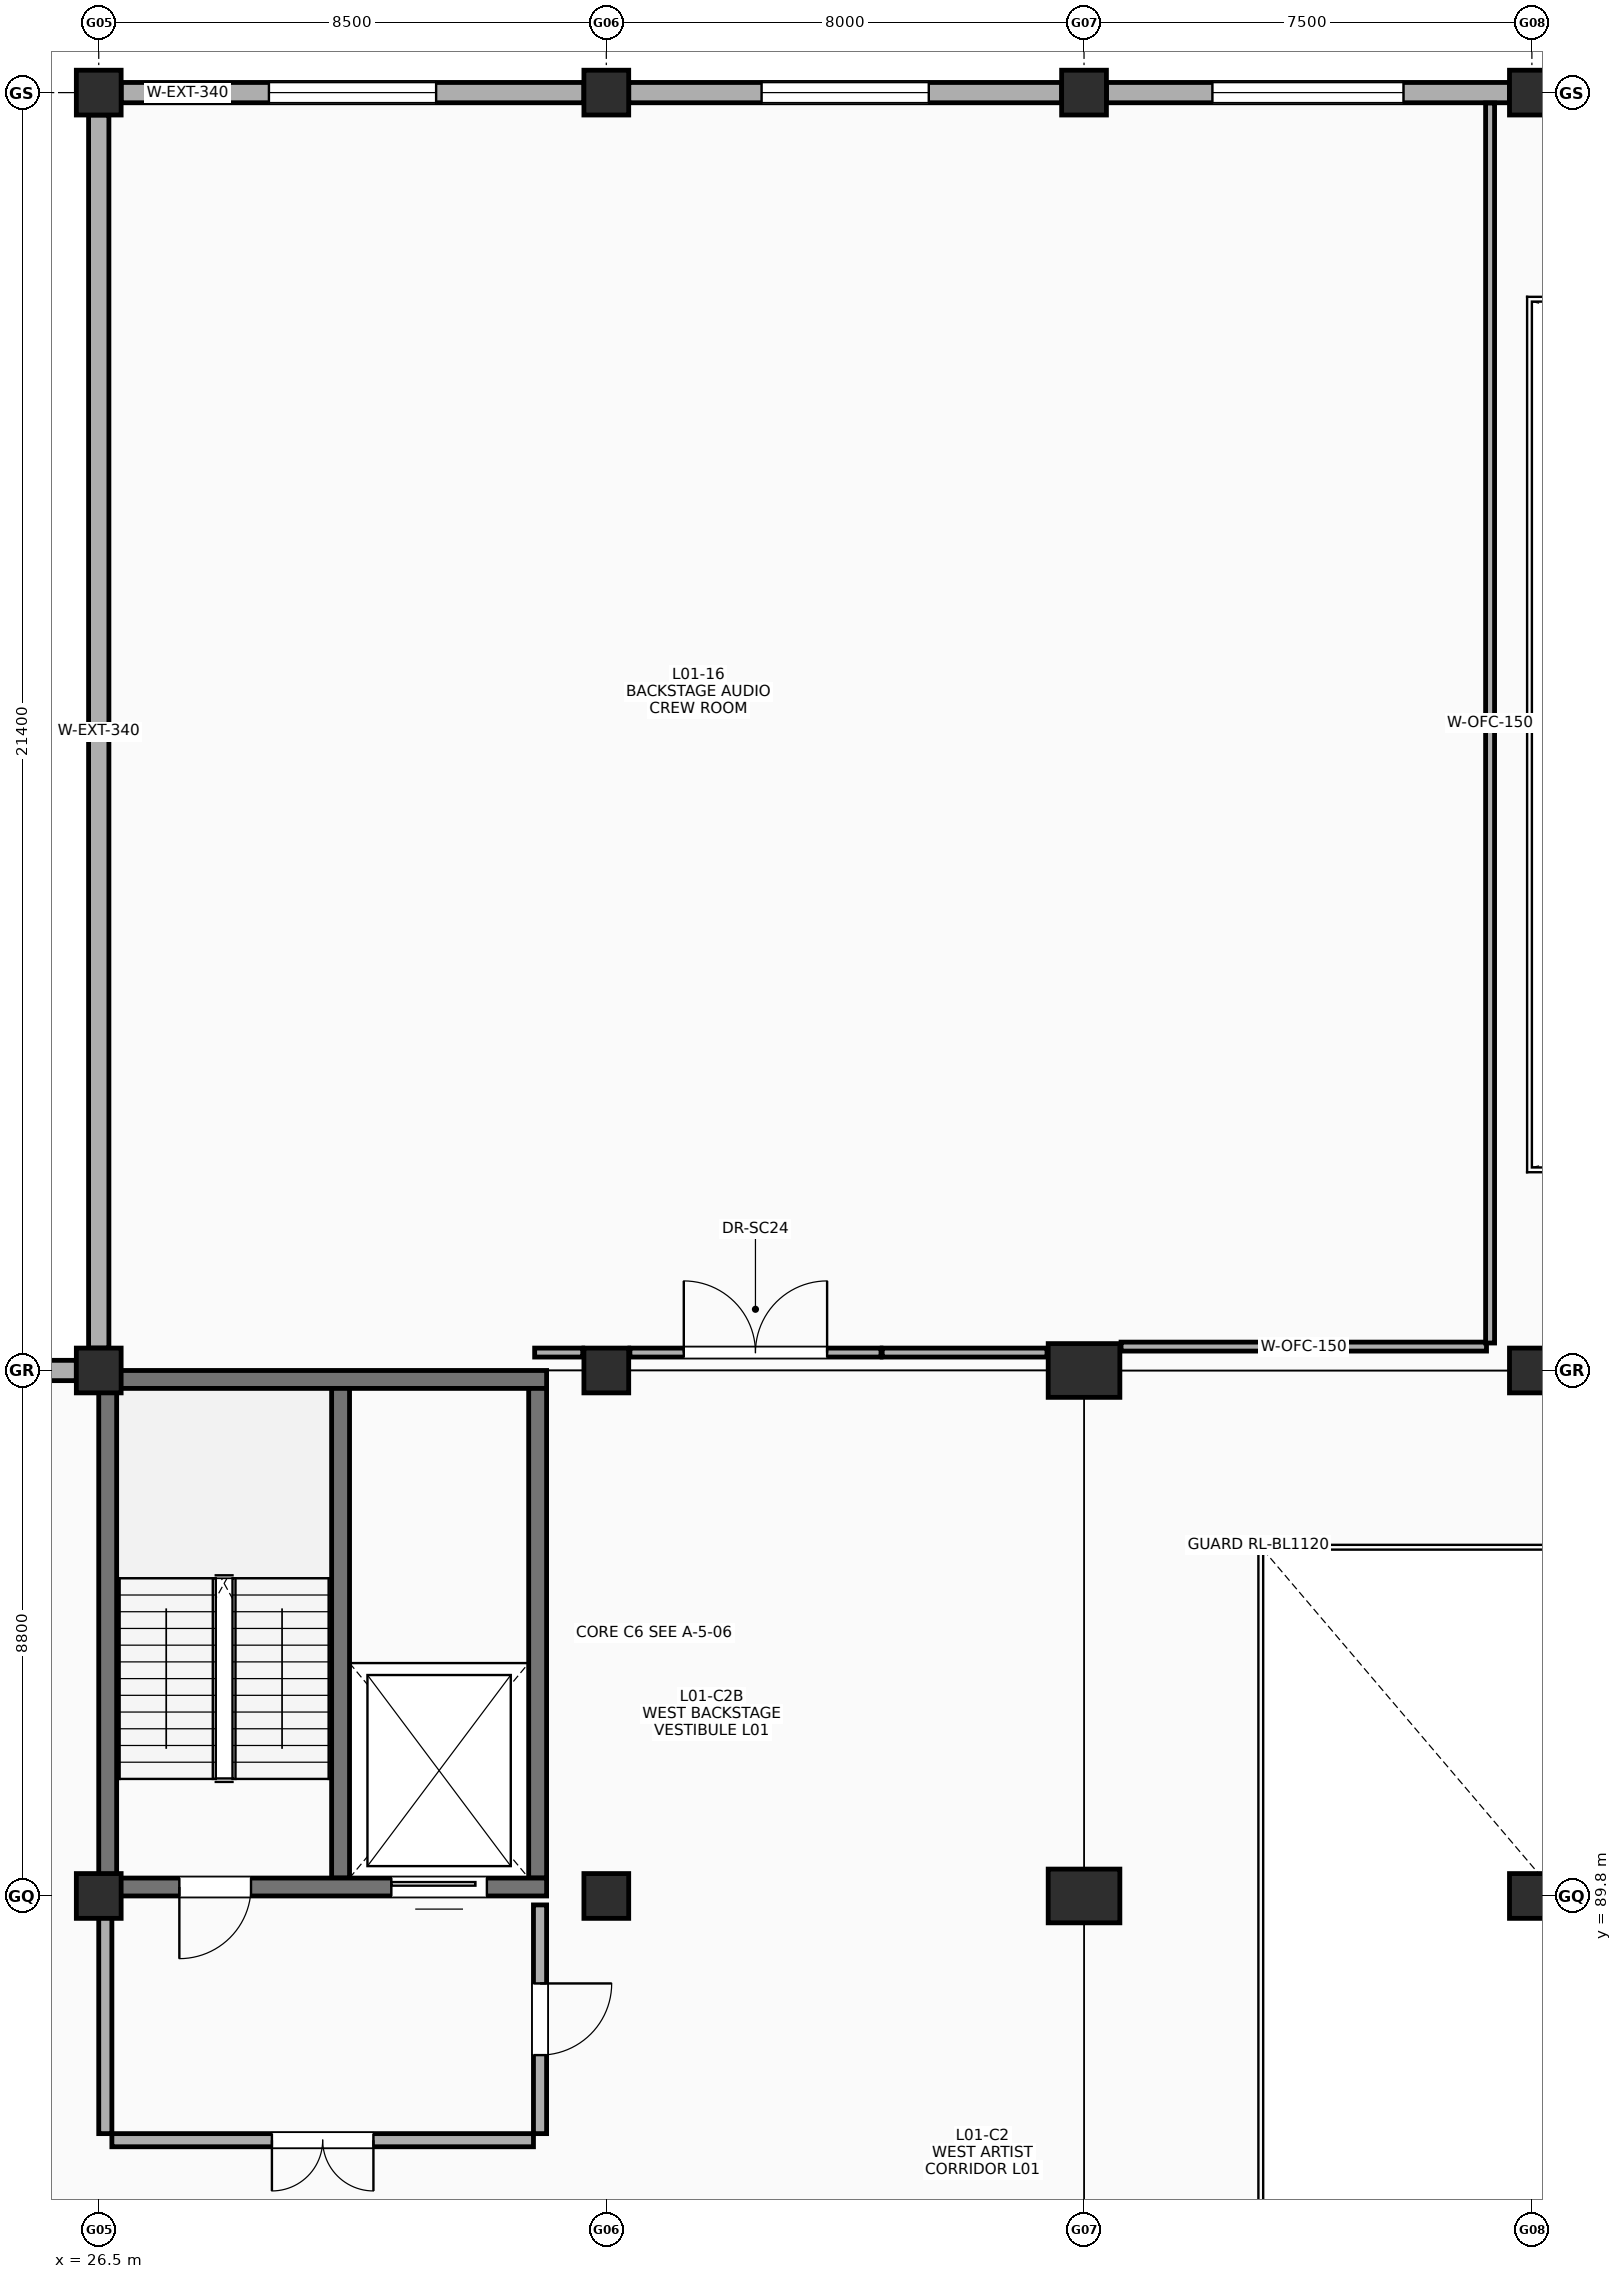
"""IFC4 building model, lengths in metres.
Left out: names, types, materials, properties, quantities, classifications, styles, units other than length and angle.
Written with IfcOpenShell. Run it as: python <this file> out.ifc"""

import sys

from ifc_helpers import new_model, si_unit, direction, frame, frame_2d, origin, origin_2d, place, context, subcontext, project, spatial, rectangle, extrude, element, fill, save


model = new_model("IFC4")
c1 = context("Model", 3, precision=1e-05, world=origin(), true_north=direction((0.0, 1.0)))
c2 = subcontext(c1, "Body", "Model", "MODEL_VIEW")
j1 = project(units=[si_unit("LENGTHUNIT", "METRE"), si_unit("PLANEANGLEUNIT", "RADIAN")], contexts=[c1])
p1 = place(None, origin())
s1 = spatial("IfcSite", under=j1, at=p1, CompositionType="ELEMENT")
p2 = place(p1, origin())
s2 = spatial("IfcBuilding", under=s1, at=p2, CompositionType="ELEMENT")
p3 = place(p2, frame((0.0, 0.0, 5.4)))
s3 = spatial("IfcBuildingStorey", under=s2, at=p3, CompositionType="ELEMENT", Elevation=5.4)
for number, where, z_axis, x_axis in (
    (1, (26.5, 89.8, 0.0), (0.0, 0.0, 1.0), (1.0, 0.0, 0.0)),
    (2, (26.5, 98.6, 0.0), (0.0, 0.0, 1.0), (1.0, 0.0, 0.0)),
    (3, (26.5, 120.0, 0.0), (0.0, 0.0, 1.0), (1.0, 0.0, 0.0)),
    (4, (35.0, 89.8, 0.0), (0.0, 0.0, 1.0), (1.0, 0.0, 0.0)),
    (5, (35.0, 98.6, 0.0), (0.0, 0.0, 1.0), (1.0, 0.0, 0.0)),
    (6, (35.0, 120.0, 0.0), (0.0, 0.0, 1.0), (1.0, 0.0, 0.0)),
):
    element("IfcColumn", number, at=place(p3, frame(where, z_axis=z_axis, x_axis=x_axis)), inside=s3, PredefinedType="COLUMN", context=c2, shape_type="SweptSolid", body=[
        extrude(rectangle(XDim=0.75, YDim=0.75, at=origin_2d()), origin(), (0.0, 0.0, 1.0), 4.4),
    ])
for number, where, z_axis, x_axis in (
    (7, (43.0, 89.8, 0.0), (0.0, 0.0, 1.0), (1.0, 0.0, 0.0)),
    (8, (43.0, 98.6, 0.0), (0.0, 0.0, 1.0), (1.0, 0.0, 0.0)),
):
    element("IfcColumn", number, at=place(p3, frame(where, z_axis=z_axis, x_axis=x_axis)), inside=s3, PredefinedType="COLUMN", context=c2, shape_type="SweptSolid", body=[
        extrude(rectangle(XDim=1.2, YDim=0.9, at=origin_2d()), origin(), (0.0, 0.0, 1.0), 4.4),
    ])
for number, where, z_axis, x_axis in (
    (9, (43.0, 120.0, 0.0), (0.0, 0.0, 1.0), (1.0, 0.0, 0.0)),
    (10, (50.5, 89.8, 0.0), (0.0, 0.0, 1.0), (1.0, 0.0, 0.0)),
    (11, (50.5, 98.6, 0.0), (0.0, 0.0, 1.0), (1.0, 0.0, 0.0)),
    (12, (50.5, 120.0, 0.0), (0.0, 0.0, 1.0), (1.0, 0.0, 0.0)),
):
    element("IfcColumn", number, at=place(p3, frame(where, z_axis=z_axis, x_axis=x_axis)), inside=s3, PredefinedType="COLUMN", context=c2, shape_type="SweptSolid", body=[
        extrude(rectangle(XDim=0.75, YDim=0.75, at=origin_2d()), origin(), (0.0, 0.0, 1.0), 4.4),
    ])
p4 = place(p3, frame((26.5, 98.45, 0.0), z_axis=(0.0, 0.0, 1.0), x_axis=(1.0, 0.0, 0.0)))
e13 = element("IfcWall", 13, at=p4, inside=s3, PredefinedType="SHEAR", context=c2, shape_type="SweptSolid", body=[
    extrude(rectangle(XDim=7.5, YDim=0.3, at=frame_2d((3.75, 0.0))), origin(), (0.0, 0.0, 1.0), 4.4),
])
for number, where, z_axis, x_axis in (
    (14, (26.65, 90.1, 0.0), (0.0, 0.0, 1.0), (0.0, 1.0, 0.0)),
    (15, (33.85, 90.1, 0.0), (0.0, 0.0, 1.0), (0.0, 1.0, 0.0)),
    (16, (30.55, 90.1, 0.0), (0.0, 0.0, 1.0), (0.0, 1.0, 0.0)),
):
    element("IfcWall", number, at=place(p3, frame(where, z_axis=z_axis, x_axis=x_axis)), inside=s3, PredefinedType="SHEAR", context=c2, shape_type="SweptSolid", body=[
        extrude(rectangle(XDim=8.2, YDim=0.3, at=frame_2d((4.1, 0.0))), origin(), (0.0, 0.0, 1.0), 4.4),
    ])
p5 = place(p3, frame((26.875, 120.0, 0.0), z_axis=(0.0, 0.0, 1.0), x_axis=(1.0, 0.0, 0.0)))
e17 = element("IfcWall", 17, at=p5, inside=s3, PredefinedType="SOLIDWALL", context=c2, shape_type="SweptSolid", body=[
    extrude(rectangle(XDim=7.75, YDim=0.34, at=frame_2d((3.875, 0.0))), origin(), (0.0, 0.0, 1.0), 3.2),
])
p6 = place(p5, frame((2.475, 0.0, 1.15)))
e18 = element("IfcOpeningElement", 18, at=p6, cuts=e17, PredefinedType="OPENING", context=c2, shape_type="SweptSolid", body=[
    extrude(rectangle(XDim=2.8, YDim=1.3, at=frame_2d((1.4, 0.65))), frame((0.0, 0.18, 0.0), z_axis=(0.0, -1.0, 0.0), x_axis=(1.0, 0.0, 0.0)), (0.0, 0.0, 1.0), 0.36),
])
p7 = place(p3, frame((35.375, 120.0, 0.0), z_axis=(0.0, 0.0, 1.0), x_axis=(1.0, 0.0, 0.0)))
e19 = element("IfcWall", 19, at=p7, inside=s3, PredefinedType="SOLIDWALL", context=c2, shape_type="SweptSolid", body=[
    extrude(rectangle(XDim=7.25, YDim=0.34, at=frame_2d((3.625, 0.0))), origin(), (0.0, 0.0, 1.0), 3.2),
])
p8 = place(p7, frame((2.225, 0.0, 1.15)))
e20 = element("IfcOpeningElement", 20, at=p8, cuts=e19, PredefinedType="OPENING", context=c2, shape_type="SweptSolid", body=[
    extrude(rectangle(XDim=2.8, YDim=1.3, at=frame_2d((1.4, 0.65))), frame((0.0, 0.18, 0.0), z_axis=(0.0, -1.0, 0.0), x_axis=(1.0, 0.0, 0.0)), (0.0, 0.0, 1.0), 0.36),
])
p9 = place(p3, frame((43.375, 120.0, 0.0), z_axis=(0.0, 0.0, 1.0), x_axis=(1.0, 0.0, 0.0)))
e21 = element("IfcWall", 21, at=p9, inside=s3, PredefinedType="SOLIDWALL", context=c2, shape_type="SweptSolid", body=[
    extrude(rectangle(XDim=6.75, YDim=0.34, at=frame_2d((3.375, 0.0))), origin(), (0.0, 0.0, 1.0), 3.2),
])
p10 = place(p9, frame((1.775, 0.0, 1.15)))
e22 = element("IfcOpeningElement", 22, at=p10, cuts=e21, PredefinedType="OPENING", context=c2, shape_type="SweptSolid", body=[
    extrude(rectangle(XDim=3.2, YDim=1.4, at=frame_2d((1.6, 0.7))), frame((0.0, 0.18, 0.0), z_axis=(0.0, -1.0, 0.0), x_axis=(1.0, 0.0, 0.0)), (0.0, 0.0, 1.0), 0.36),
])
p11 = place(p3, frame((19.375, 98.6, 0.0), z_axis=(0.0, 0.0, 1.0), x_axis=(1.0, 0.0, 0.0)))
e23 = element("IfcWall", 23, at=p11, inside=s3, PredefinedType="SOLIDWALL", context=c2, shape_type="SweptSolid", body=[
    extrude(rectangle(XDim=6.75, YDim=0.34, at=frame_2d((3.375, 0.0))), origin(), (0.0, 0.0, 1.0), 3.2),
])
p12 = place(p3, frame((26.5, 98.975, 0.0), z_axis=(0.0, 0.0, 1.0), x_axis=(0.0, 1.0, 0.0)))
e24 = element("IfcWall", 24, at=p12, inside=s3, PredefinedType="SOLIDWALL", context=c2, shape_type="SweptSolid", body=[
    extrude(rectangle(XDim=20.65, YDim=0.34, at=frame_2d((10.325, 0.0))), origin(), (0.0, 0.0, 1.0), 3.2),
])
p13 = place(p3, frame((26.5, 89.95, 0.0), z_axis=(0.0, 0.0, 1.0), x_axis=(1.0, 0.0, 0.0)))
e25 = element("IfcWall", 25, at=p13, inside=s3, PredefinedType="SHEAR", context=c2, shape_type="SweptSolid", body=[
    extrude(rectangle(XDim=7.5, YDim=0.3, at=frame_2d((3.75, 0.0))), origin(), (0.0, 0.0, 1.0), 4.4),
])
p14 = place(p13, frame((2.55, 0.0, 0.0), z_axis=(0.0, 0.0, 1.0), x_axis=(-1.0, 0.0, 0.0)))
e26 = element("IfcOpeningElement", 26, at=p14, cuts=e25, PredefinedType="OPENING", context=c2, shape_type="SweptSolid", body=[
    extrude(rectangle(XDim=1.2, YDim=2.15, at=frame_2d((0.6, 1.075))), frame((0.0, 0.16, 0.0), z_axis=(0.0, -1.0, 0.0), x_axis=(1.0, 0.0, 0.0)), (0.0, 0.0, 1.0), 0.32),
])
p15 = place(p13, frame((4.9, 0.0, 0.0)))
e27 = element("IfcOpeningElement", 27, at=p15, cuts=e25, PredefinedType="OPENING", context=c2, shape_type="SweptSolid", body=[
    extrude(rectangle(XDim=1.6, YDim=2.25, at=frame_2d((0.8, 1.125))), frame((0.0, 0.16, 0.0), z_axis=(0.0, -1.0, 0.0), x_axis=(1.0, 0.0, 0.0)), (0.0, 0.0, 1.0), 0.32),
])
p16 = place(p3, frame((26.72, 85.71, 0.0), z_axis=(0.0, 0.0, 1.0), x_axis=(1.0, 0.0, 0.0)))
e28 = element("IfcWall", 28, at=p16, inside=s3, PredefinedType="SOLIDWALL", context=c2, shape_type="SweptSolid", body=[
    extrude(rectangle(XDim=7.06, YDim=0.22, at=frame_2d((3.53, 0.0))), origin(), (0.0, 0.0, 1.0), 3.3),
])
p17 = place(p16, frame((4.38, 0.0, 0.0), z_axis=(0.0, 0.0, 1.0), x_axis=(-1.0, 0.0, 0.0)))
e29 = element("IfcOpeningElement", 29, at=p17, cuts=e28, PredefinedType="OPENING", context=c2, shape_type="SweptSolid", body=[
    extrude(rectangle(XDim=1.7, YDim=2.18, at=frame_2d((0.85, 1.09))), frame((0.0, 0.12, 0.0), z_axis=(0.0, -1.0, 0.0), x_axis=(1.0, 0.0, 0.0)), (0.0, 0.0, 1.0), 0.24),
])
p18 = place(p3, frame((26.61, 85.82, 0.0), z_axis=(0.0, 0.0, 1.0), x_axis=(0.0, 1.0, 0.0)))
e30 = element("IfcWall", 30, at=p18, inside=s3, PredefinedType="SOLIDWALL", context=c2, shape_type="SweptSolid", body=[
    extrude(rectangle(XDim=3.83, YDim=0.22, at=frame_2d((1.915, 0.0))), origin(), (0.0, 0.0, 1.0), 3.3),
])
p19 = place(p3, frame((33.89, 85.82, 0.0), z_axis=(0.0, 0.0, 1.0), x_axis=(0.0, 1.0, 0.0)))
e31 = element("IfcWall", 31, at=p19, inside=s3, PredefinedType="SOLIDWALL", context=c2, shape_type="SweptSolid", body=[
    extrude(rectangle(XDim=3.83, YDim=0.22, at=frame_2d((1.915, 0.0))), origin(), (0.0, 0.0, 1.0), 3.3),
])
p20 = place(p19, frame((2.515, 0.0, 0.0), z_axis=(0.0, 0.0, 1.0), x_axis=(-1.0, 0.0, 0.0)))
e32 = element("IfcOpeningElement", 32, at=p20, cuts=e31, PredefinedType="OPENING", context=c2, shape_type="SweptSolid", body=[
    extrude(rectangle(XDim=1.2, YDim=2.15, at=frame_2d((0.6, 1.075))), frame((0.0, 0.12, 0.0), z_axis=(0.0, -1.0, 0.0), x_axis=(1.0, 0.0, 0.0)), (0.0, 0.0, 1.0), 0.24),
])
p21 = place(p3, frame((35.395, 98.9, 0.0), z_axis=(0.0, 0.0, 1.0), x_axis=(1.0, 0.0, 0.0)))
e33 = element("IfcWall", 33, at=p21, inside=s3, PredefinedType="PARTITIONING", context=c2, shape_type="SweptSolid", body=[
    extrude(rectangle(XDim=4.205, YDim=0.15, at=frame_2d((2.103, 0.0))), origin(), (0.0, 0.0, 1.0), 3.3),
])
p22 = place(p21, frame((0.903, 0.0, 0.0)))
e34 = element("IfcOpeningElement", 34, at=p22, cuts=e33, PredefinedType="OPENING", context=c2, shape_type="SweptSolid", body=[
    extrude(rectangle(XDim=2.4, YDim=2.6, at=frame_2d((1.2, 1.3))), frame((0.0, 0.085, 0.0), z_axis=(0.0, -1.0, 0.0), x_axis=(1.0, 0.0, 0.0)), (0.0, 0.0, 1.0), 0.17),
])
p23 = place(p3, frame((33.8, 98.9, 0.0), z_axis=(0.0, 0.0, 1.0), x_axis=(1.0, 0.0, 0.0)))
e35 = element("IfcWall", 35, at=p23, inside=s3, PredefinedType="PARTITIONING", context=c2, shape_type="SweptSolid", body=[
    extrude(rectangle(XDim=0.805, YDim=0.15, at=frame_2d((0.402, 0.0))), origin(), (0.0, 0.0, 1.0), 3.3),
])
p24 = place(p3, frame((43.62, 99.0, 0.0), z_axis=(0.0, 0.0, 1.0), x_axis=(1.0, 0.0, 0.0)))
e36 = element("IfcWall", 36, at=p24, inside=s3, PredefinedType="PARTITIONING", context=c2, shape_type="SweptSolid", body=[
    extrude(rectangle(XDim=6.12, YDim=0.15, at=frame_2d((3.06, 0.0))), origin(), (0.0, 0.0, 1.0), 4.02),
])
p25 = place(p3, frame((49.8, 99.06, 0.0), z_axis=(0.0, 0.0, 1.0), x_axis=(0.0, 1.0, 0.0)))
e37 = element("IfcWall", 37, at=p25, inside=s3, PredefinedType="PARTITIONING", context=c2, shape_type="SweptSolid", body=[
    extrude(rectangle(XDim=20.765, YDim=0.15, at=frame_2d((10.382, 0.0))), origin(), (0.0, 0.0, 1.0), 3.45),
])
p26 = place(p3, frame((39.62, 98.9, 0.0), z_axis=(0.0, 0.0, 1.0), x_axis=(1.0, 0.0, 0.0)))
e38 = element("IfcWall", 38, at=p26, inside=s3, PredefinedType="PARTITIONING", context=c2, shape_type="SweptSolid", body=[
    extrude(rectangle(XDim=2.76, YDim=0.15, at=frame_2d((1.38, 0.0))), origin(), (0.0, 0.0, 1.0), 3.3),
])
p27 = place(p6, origin())
e39 = element("IfcWindow", 39, at=p27, inside=s3, PartitioningType="SINGLE_PANEL", PredefinedType="WINDOW", context=c2, shape_type="SweptSolid", body=[
    extrude(rectangle(XDim=2.8, YDim=1.3, at=frame_2d((1.4, 0.65))), frame((0.0, 0.03, 0.0), z_axis=(0.0, -1.0, 0.0), x_axis=(1.0, 0.0, 0.0)), (0.0, 0.0, 1.0), 0.06),
])
fill(e18, e39)
p28 = place(p8, origin())
e40 = element("IfcWindow", 40, at=p28, inside=s3, PartitioningType="SINGLE_PANEL", PredefinedType="WINDOW", context=c2, shape_type="SweptSolid", body=[
    extrude(rectangle(XDim=2.8, YDim=1.3, at=frame_2d((1.4, 0.65))), frame((0.0, 0.03, 0.0), z_axis=(0.0, -1.0, 0.0), x_axis=(1.0, 0.0, 0.0)), (0.0, 0.0, 1.0), 0.06),
])
fill(e20, e40)
p29 = place(p10, origin())
e41 = element("IfcWindow", 41, at=p29, inside=s3, PartitioningType="SINGLE_PANEL", PredefinedType="WINDOW", context=c2, shape_type="SweptSolid", body=[
    extrude(rectangle(XDim=3.2, YDim=1.4, at=frame_2d((1.6, 0.7))), frame((0.0, 0.03, 0.0), z_axis=(0.0, -1.0, 0.0), x_axis=(1.0, 0.0, 0.0)), (0.0, 0.0, 1.0), 0.06),
])
fill(e22, e41)
p30 = place(p14, origin())
e42 = element("IfcDoor", 42, at=p30, inside=s3, OperationType="SINGLE_SWING_RIGHT", PredefinedType="DOOR", context=c2, shape_type="SweptSolid", body=[
    extrude(rectangle(XDim=1.2, YDim=2.15, at=frame_2d((0.6, 1.075))), frame((0.0, 0.025, 0.0), z_axis=(0.0, -1.0, 0.0), x_axis=(1.0, 0.0, 0.0)), (0.0, 0.0, 1.0), 0.05),
])
fill(e26, e42)
p31 = place(p15, origin())
e43 = element("IfcDoor", 43, at=p31, inside=s3, OperationType="SLIDING_TO_LEFT", PredefinedType="DOOR", context=c2, shape_type="SweptSolid", body=[
    extrude(rectangle(XDim=1.6, YDim=2.25, at=frame_2d((0.8, 1.125))), frame((0.0, 0.025, 0.0), z_axis=(0.0, -1.0, 0.0), x_axis=(1.0, 0.0, 0.0)), (0.0, 0.0, 1.0), 0.05),
])
fill(e27, e43)
p32 = place(p17, origin())
e44 = element("IfcDoor", 44, at=p32, inside=s3, OperationType="DOUBLE_DOOR_SINGLE_SWING", PredefinedType="DOOR", context=c2, shape_type="SweptSolid", body=[
    extrude(rectangle(XDim=1.7, YDim=2.18, at=frame_2d((0.85, 1.09))), frame((0.0, 0.025, 0.0), z_axis=(0.0, -1.0, 0.0), x_axis=(1.0, 0.0, 0.0)), (0.0, 0.0, 1.0), 0.05),
])
fill(e29, e44)
p33 = place(p20, origin())
e45 = element("IfcDoor", 45, at=p33, inside=s3, OperationType="SINGLE_SWING_LEFT", PredefinedType="DOOR", context=c2, shape_type="SweptSolid", body=[
    extrude(rectangle(XDim=1.2, YDim=2.15, at=frame_2d((0.6, 1.075))), frame((0.0, 0.025, 0.0), z_axis=(0.0, -1.0, 0.0), x_axis=(1.0, 0.0, 0.0)), (0.0, 0.0, 1.0), 0.05),
])
fill(e32, e45)
p34 = place(p22, origin())
e46 = element("IfcDoor", 46, at=p34, inside=s3, OperationType="DOUBLE_DOOR_SINGLE_SWING", PredefinedType="DOOR", context=c2, shape_type="SweptSolid", body=[
    extrude(rectangle(XDim=2.4, YDim=2.6, at=frame_2d((1.2, 1.3))), frame((0.0, 0.025, 0.0), z_axis=(0.0, -1.0, 0.0), x_axis=(1.0, 0.0, 0.0)), (0.0, 0.0, 1.0), 0.05),
])
fill(e34, e46)
save(model, sys.argv[1])
